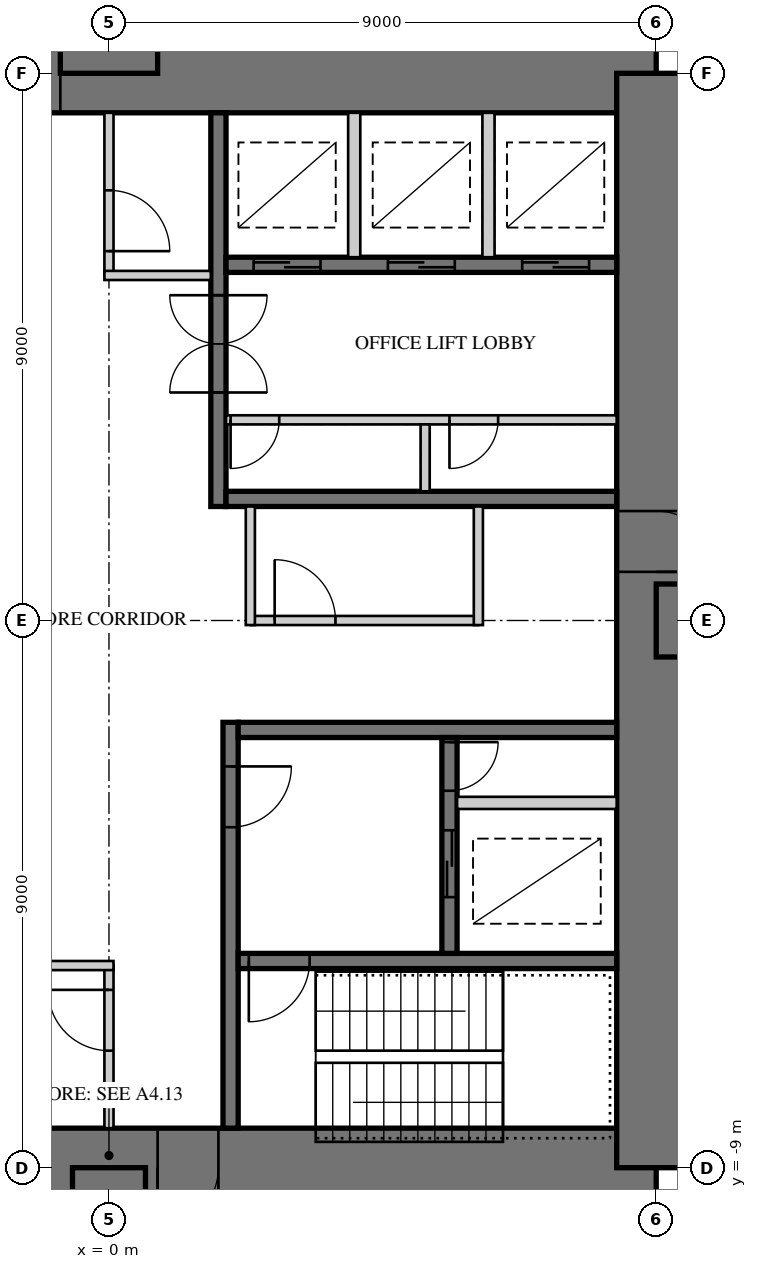
"""IFC4 building model, lengths in metres.
Left out: names, types, materials, properties, quantities, classifications, styles, units other than length and angle.
Written with IfcOpenShell. Run it as: python <this file> out.ifc"""

import sys

from ifc_helpers import new_model, si_unit, direction, frame, frame_2d, origin, place, context, subcontext, project, spatial, rectangle, extrude, element, fill, save


model = new_model("IFC4")
c1 = context("Model", 3, precision=1e-05, world=origin(), true_north=direction((0.0, 1.0)))
c2 = subcontext(c1, "Body", "Model", "MODEL_VIEW")
j1 = project(units=[si_unit("LENGTHUNIT", "METRE"), si_unit("PLANEANGLEUNIT", "RADIAN")], contexts=[c1])
p1 = place(None, origin())
s1 = spatial("IfcSite", under=j1, at=p1, CompositionType="ELEMENT")
p2 = place(p1, origin())
s2 = spatial("IfcBuilding", under=s1, at=p2, CompositionType="ELEMENT")
p3 = place(p2, frame((0.0, 0.0, 59.5)))
s3 = spatial("IfcBuildingStorey", under=s2, at=p3, CompositionType="ELEMENT", Elevation=59.5)
p4 = place(p3, frame((9.0, 9.0, 0.0), z_axis=(0.0, 0.0, 1.0), x_axis=(-1.0, 0.0, 0.0)))
e1 = element("IfcWall", 1, at=p4, inside=s3, PredefinedType="SHEAR", context=c2, shape_type="SweptSolid", body=[
    extrude(rectangle(XDim=18.0, YDim=1.3, at=frame_2d((9.0, 0.0))), origin(), (0.0, 0.0, 1.0), 4.0),
])
p5 = place(p4, frame((9.8, 0.0, 0.0)))
e2 = element("IfcOpeningElement", 2, at=p5, cuts=e1, PredefinedType="OPENING", context=c2, shape_type="SweptSolid", body=[
    extrude(rectangle(XDim=1.0, YDim=2.4, at=frame_2d((0.5, 1.2))), frame((0.0, 0.66, 0.0), z_axis=(0.0, -1.0, 0.0), x_axis=(1.0, 0.0, 0.0)), (0.0, 0.0, 1.0), 1.32),
])
p6 = place(p3, frame((-9.0, -9.0, 0.0), z_axis=(0.0, 0.0, 1.0), x_axis=(1.0, 0.0, 0.0)))
e3 = element("IfcWall", 3, at=p6, inside=s3, PredefinedType="SHEAR", context=c2, shape_type="SweptSolid", body=[
    extrude(rectangle(XDim=18.0, YDim=1.3, at=frame_2d((9.0, 0.0))), origin(), (0.0, 0.0, 1.0), 4.0),
])
p7 = place(p6, frame((9.8, 0.0, 0.0)))
e4 = element("IfcOpeningElement", 4, at=p7, cuts=e3, PredefinedType="OPENING", context=c2, shape_type="SweptSolid", body=[
    extrude(rectangle(XDim=1.0, YDim=2.4, at=frame_2d((0.5, 1.2))), frame((0.0, 0.66, 0.0), z_axis=(0.0, -1.0, 0.0), x_axis=(1.0, 0.0, 0.0)), (0.0, 0.0, 1.0), 1.32),
])
p8 = place(p3, frame((9.0, -9.0, 0.0), z_axis=(0.0, 0.0, 1.0), x_axis=(0.0, 1.0, 0.0)))
e5 = element("IfcWall", 5, at=p8, inside=s3, PredefinedType="SHEAR", context=c2, shape_type="SweptSolid", body=[
    extrude(rectangle(XDim=18.0, YDim=1.3, at=frame_2d((9.0, 0.0))), origin(), (0.0, 0.0, 1.0), 4.0),
])
p9 = place(p8, frame((9.8, 0.0, 0.0)))
e6 = element("IfcOpeningElement", 6, at=p9, cuts=e5, PredefinedType="OPENING", context=c2, shape_type="SweptSolid", body=[
    extrude(rectangle(XDim=1.0, YDim=2.4, at=frame_2d((0.5, 1.2))), frame((0.0, 0.66, 0.0), z_axis=(0.0, -1.0, 0.0), x_axis=(1.0, 0.0, 0.0)), (0.0, 0.0, 1.0), 1.32),
])
p10 = place(p3, frame((1.8, 1.875, 0.0), z_axis=(0.0, 0.0, 1.0), x_axis=(0.0, 1.0, 0.0)))
e7 = element("IfcWall", 7, at=p10, inside=s3, PredefinedType="SHEAR", context=c2, shape_type="SweptSolid", body=[
    extrude(rectangle(XDim=6.475, YDim=0.25, at=frame_2d((3.238, 0.0))), origin(), (0.0, 0.0, 1.0), 4.0),
])
p11 = place(p10, frame((1.875, 0.0, 0.0)))
e8 = element("IfcOpeningElement", 8, at=p11, cuts=e7, PredefinedType="OPENING", context=c2, shape_type="SweptSolid", body=[
    extrude(rectangle(XDim=1.6, YDim=2.4, at=frame_2d((0.8, 1.2))), frame((0.0, 0.135, 0.0), z_axis=(0.0, -1.0, 0.0), x_axis=(1.0, 0.0, 0.0)), (0.0, 0.0, 1.0), 0.27),
])
p12 = place(p3, frame((1.925, 2.0, 0.0), z_axis=(0.0, 0.0, 1.0), x_axis=(1.0, 0.0, 0.0)))
e9 = element("IfcWall", 9, at=p12, inside=s3, PredefinedType="SHEAR", context=c2, shape_type="SweptSolid", body=[
    extrude(rectangle(XDim=6.425, YDim=0.25, at=frame_2d((3.212, 0.0))), origin(), (0.0, 0.0, 1.0), 4.0),
])
p13 = place(p3, frame((1.925, 5.85, 0.0), z_axis=(0.0, 0.0, 1.0), x_axis=(1.0, 0.0, 0.0)))
e10 = element("IfcWall", 10, at=p13, inside=s3, PredefinedType="SHEAR", context=c2, shape_type="SweptSolid", body=[
    extrude(rectangle(XDim=6.425, YDim=0.25, at=frame_2d((3.212, 0.0))), origin(), (0.0, 0.0, 1.0), 4.0),
])
p14 = place(p13, frame((0.454, 0.0, 0.0)))
e11 = element("IfcOpeningElement", 11, at=p14, cuts=e10, PredefinedType="OPENING", context=c2, shape_type="SweptSolid", body=[
    extrude(rectangle(XDim=1.1, YDim=2.2, at=frame_2d((0.55, 1.1))), frame((0.0, 0.135, 0.0), z_axis=(0.0, -1.0, 0.0), x_axis=(1.0, 0.0, 0.0)), (0.0, 0.0, 1.0), 0.27),
])
p15 = place(p13, frame((2.663, 0.0, 0.0)))
e12 = element("IfcOpeningElement", 12, at=p15, cuts=e10, PredefinedType="OPENING", context=c2, shape_type="SweptSolid", body=[
    extrude(rectangle(XDim=1.1, YDim=2.2, at=frame_2d((0.55, 1.1))), frame((0.0, 0.135, 0.0), z_axis=(0.0, -1.0, 0.0), x_axis=(1.0, 0.0, 0.0)), (0.0, 0.0, 1.0), 0.27),
])
p16 = place(p13, frame((4.871, 0.0, 0.0)))
e13 = element("IfcOpeningElement", 13, at=p16, cuts=e10, PredefinedType="OPENING", context=c2, shape_type="SweptSolid", body=[
    extrude(rectangle(XDim=1.1, YDim=2.2, at=frame_2d((0.55, 1.1))), frame((0.0, 0.135, 0.0), z_axis=(0.0, -1.0, 0.0), x_axis=(1.0, 0.0, 0.0)), (0.0, 0.0, 1.0), 0.27),
])
p17 = place(p3, frame((1.925, 3.3, 0.0), z_axis=(0.0, 0.0, 1.0), x_axis=(1.0, 0.0, 0.0)))
e14 = element("IfcWall", 14, at=p17, inside=s3, PredefinedType="PARTITIONING", context=c2, shape_type="SweptSolid", body=[
    extrude(rectangle(XDim=6.425, YDim=0.15, at=frame_2d((3.212, 0.0))), origin(), (0.0, 0.0, 1.0), 4.0),
])
p18 = place(p17, frame((0.075, 0.0, 0.0)))
e15 = element("IfcOpeningElement", 15, at=p18, cuts=e14, PredefinedType="OPENING", context=c2, shape_type="SweptSolid", body=[
    extrude(rectangle(XDim=0.8, YDim=2.1, at=frame_2d((0.4, 1.05))), frame((0.0, 0.085, 0.0), z_axis=(0.0, -1.0, 0.0), x_axis=(1.0, 0.0, 0.0)), (0.0, 0.0, 1.0), 0.17),
])
p19 = place(p17, frame((3.675, 0.0, 0.0)))
e16 = element("IfcOpeningElement", 16, at=p19, cuts=e14, PredefinedType="OPENING", context=c2, shape_type="SweptSolid", body=[
    extrude(rectangle(XDim=0.8, YDim=2.1, at=frame_2d((0.4, 1.05))), frame((0.0, 0.085, 0.0), z_axis=(0.0, -1.0, 0.0), x_axis=(1.0, 0.0, 0.0)), (0.0, 0.0, 1.0), 0.17),
])
p20 = place(p3, frame((5.2, 2.125, 0.0), z_axis=(0.0, 0.0, 1.0), x_axis=(0.0, 1.0, 0.0)))
e17 = element("IfcWall", 17, at=p20, inside=s3, PredefinedType="PARTITIONING", context=c2, shape_type="SweptSolid", body=[
    extrude(rectangle(XDim=1.1, YDim=0.15, at=frame_2d((0.55, 0.0))), origin(), (0.0, 0.0, 1.0), 4.0),
])
for number, where, z_axis, x_axis in (
    (18, (4.033, 5.975, 0.0), (0.0, 0.0, 1.0), (0.0, 1.0, 0.0)),
    (19, (6.242, 5.975, 0.0), (0.0, 0.0, 1.0), (0.0, 1.0, 0.0)),
):
    element("IfcWall", number, at=place(p3, frame(where, z_axis=z_axis, x_axis=x_axis)), inside=s3, PredefinedType="PARTITIONING", context=c2, shape_type="SweptSolid", body=[
        extrude(rectangle(XDim=2.375, YDim=0.2, at=frame_2d((1.188, 0.0))), origin(), (0.0, 0.0, 1.0), 4.0),
    ])
p21 = place(p3, frame((2.0, -1.675, 0.0), z_axis=(0.0, 0.0, 1.0), x_axis=(0.0, -1.0, 0.0)))
e20 = element("IfcWall", 20, at=p21, inside=s3, PredefinedType="SHEAR", context=c2, shape_type="SweptSolid", body=[
    extrude(rectangle(XDim=6.675, YDim=0.25, at=frame_2d((3.337, 0.0))), origin(), (0.0, 0.0, 1.0), 4.0),
])
p22 = place(p21, frame((0.725, 0.0, 0.0)))
e21 = element("IfcOpeningElement", 21, at=p22, cuts=e20, PredefinedType="OPENING", context=c2, shape_type="SweptSolid", body=[
    extrude(rectangle(XDim=1.0, YDim=2.1, at=frame_2d((0.5, 1.05))), frame((0.0, 0.135, 0.0), z_axis=(0.0, -1.0, 0.0), x_axis=(1.0, 0.0, 0.0)), (0.0, 0.0, 1.0), 0.27),
])
p23 = place(p3, frame((2.125, -1.8, 0.0), z_axis=(0.0, 0.0, 1.0), x_axis=(1.0, 0.0, 0.0)))
e22 = element("IfcWall", 22, at=p23, inside=s3, PredefinedType="SHEAR", context=c2, shape_type="SweptSolid", body=[
    extrude(rectangle(XDim=6.225, YDim=0.25, at=frame_2d((3.113, 0.0))), origin(), (0.0, 0.0, 1.0), 4.0),
])
p24 = place(p3, frame((2.125, -5.6, 0.0), z_axis=(0.0, 0.0, 1.0), x_axis=(1.0, 0.0, 0.0)))
e23 = element("IfcWall", 23, at=p24, inside=s3, PredefinedType="SHEAR", context=c2, shape_type="SweptSolid", body=[
    extrude(rectangle(XDim=6.225, YDim=0.25, at=frame_2d((3.113, 0.0))), origin(), (0.0, 0.0, 1.0), 4.0),
])
p25 = place(p24, frame((0.175, 0.0, 0.0)))
e24 = element("IfcOpeningElement", 24, at=p25, cuts=e23, PredefinedType="OPENING", context=c2, shape_type="SweptSolid", body=[
    extrude(rectangle(XDim=1.0, YDim=2.1, at=frame_2d((0.5, 1.05))), frame((0.0, 0.135, 0.0), z_axis=(0.0, -1.0, 0.0), x_axis=(1.0, 0.0, 0.0)), (0.0, 0.0, 1.0), 0.27),
])
p26 = place(p3, frame((5.6, -1.925, 0.0), z_axis=(0.0, 0.0, 1.0), x_axis=(0.0, -1.0, 0.0)))
e25 = element("IfcWall", 25, at=p26, inside=s3, PredefinedType="SHEAR", context=c2, shape_type="SweptSolid", body=[
    extrude(rectangle(XDim=3.55, YDim=0.25, at=frame_2d((1.775, 0.0))), origin(), (0.0, 0.0, 1.0), 4.0),
])
p27 = place(p26, frame((1.525, 0.0, 0.0)))
e26 = element("IfcOpeningElement", 26, at=p27, cuts=e25, PredefinedType="OPENING", context=c2, shape_type="SweptSolid", body=[
    extrude(rectangle(XDim=1.1, YDim=2.2, at=frame_2d((0.55, 1.1))), frame((0.0, 0.135, 0.0), z_axis=(0.0, -1.0, 0.0), x_axis=(1.0, 0.0, 0.0)), (0.0, 0.0, 1.0), 0.27),
])
p28 = place(p26, frame((0.075, 0.0, 0.0)))
e27 = element("IfcOpeningElement", 27, at=p28, cuts=e25, PredefinedType="OPENING", context=c2, shape_type="SweptSolid", body=[
    extrude(rectangle(XDim=0.8, YDim=2.1, at=frame_2d((0.4, 1.05))), frame((0.0, 0.135, 0.0), z_axis=(0.0, -1.0, 0.0), x_axis=(1.0, 0.0, 0.0)), (0.0, 0.0, 1.0), 0.27),
])
p29 = place(p3, frame((5.725, -3.0, 0.0), z_axis=(0.0, 0.0, 1.0), x_axis=(1.0, 0.0, 0.0)))
e28 = element("IfcWall", 28, at=p29, inside=s3, PredefinedType="PARTITIONING", context=c2, shape_type="SweptSolid", body=[
    extrude(rectangle(XDim=2.625, YDim=0.2, at=frame_2d((1.312, 0.0))), origin(), (0.0, 0.0, 1.0), 4.0),
])
p30 = place(p3, frame((0.0, 9.0, 0.0), z_axis=(0.0, 0.0, 1.0), x_axis=(0.0, 1.0, 0.0)))
e29 = element("IfcWall", 29, at=p30, inside=s3, PredefinedType="SHEAR", context=c2, shape_type="SweptSolid", body=[
    extrude(rectangle(XDim=9.0, YDim=1.6, at=frame_2d((4.5, 0.0))), origin(), (0.0, 0.0, 1.0), 4.0),
])
p31 = place(p3, frame((9.0, 0.0, 0.0), z_axis=(0.0, 0.0, 1.0), x_axis=(1.0, 0.0, 0.0)))
e30 = element("IfcWall", 30, at=p31, inside=s3, PredefinedType="SHEAR", context=c2, shape_type="SweptSolid", body=[
    extrude(rectangle(XDim=18.0, YDim=1.2, at=frame_2d((9.0, 0.0))), origin(), (0.0, 0.0, 1.0), 4.0),
])
p32 = place(p31, frame((9.9, 0.0, 0.0)))
e31 = element("IfcOpeningElement", 31, at=p32, cuts=e30, PredefinedType="OPENING", context=c2, shape_type="SweptSolid", body=[
    extrude(rectangle(XDim=1.0, YDim=2.2, at=frame_2d((0.5, 1.1))), frame((0.0, 0.61, 0.0), z_axis=(0.0, -1.0, 0.0), x_axis=(1.0, 0.0, 0.0)), (0.0, 0.0, 1.0), 1.22),
])
p33 = place(p3, frame((0.0, -9.0, 0.0), z_axis=(0.0, 0.0, 1.0), x_axis=(0.0, -1.0, 0.0)))
e32 = element("IfcWall", 32, at=p33, inside=s3, PredefinedType="SHEAR", context=c2, shape_type="SweptSolid", body=[
    extrude(rectangle(XDim=18.0, YDim=1.2, at=frame_2d((9.0, 0.0))), origin(), (0.0, 0.0, 1.0), 4.0),
])
p34 = place(p33, frame((9.9, 0.0, 0.0)))
e33 = element("IfcOpeningElement", 33, at=p34, cuts=e32, PredefinedType="OPENING", context=c2, shape_type="SweptSolid", body=[
    extrude(rectangle(XDim=1.0, YDim=2.2, at=frame_2d((0.5, 1.1))), frame((0.0, 0.61, 0.0), z_axis=(0.0, -1.0, 0.0), x_axis=(1.0, 0.0, 0.0)), (0.0, 0.0, 1.0), 1.22),
])
p35 = place(p3, frame((2.325, 0.0, 0.0), z_axis=(0.0, 0.0, 1.0), x_axis=(1.0, 0.0, 0.0)))
e34 = element("IfcWall", 34, at=p35, inside=s3, PredefinedType="PARTITIONING", context=c2, shape_type="SweptSolid", body=[
    extrude(rectangle(XDim=3.75, YDim=0.15, at=frame_2d((1.875, 0.0))), origin(), (0.0, 0.0, 1.0), 3.8),
])
p36 = place(p35, frame((0.4, 0.0, 0.0)))
e35 = element("IfcOpeningElement", 35, at=p36, cuts=e34, PredefinedType="OPENING", context=c2, shape_type="SweptSolid", body=[
    extrude(rectangle(XDim=1.0, YDim=2.1, at=frame_2d((0.5, 1.05))), frame((0.0, 0.085, 0.0), z_axis=(0.0, -1.0, 0.0), x_axis=(1.0, 0.0, 0.0)), (0.0, 0.0, 1.0), 0.17),
])
for number, where, z_axis, x_axis in (
    (36, (2.325, 1.875, 0.0), (0.0, 0.0, 1.0), (0.0, -1.0, 0.0)),
    (37, (6.075, -0.075, 0.0), (0.0, 0.0, 1.0), (0.0, 1.0, 0.0)),
):
    element("IfcWall", number, at=place(p3, frame(where, z_axis=z_axis, x_axis=x_axis)), inside=s3, PredefinedType="PARTITIONING", context=c2, shape_type="SweptSolid", body=[
        extrude(rectangle(XDim=1.95, YDim=0.15, at=frame_2d((0.975, 0.0))), origin(), (0.0, 0.0, 1.0), 3.8),
    ])
p37 = place(p3, frame((0.0, 5.675, 0.0), z_axis=(0.0, 0.0, 1.0), x_axis=(0.0, 1.0, 0.0)))
e38 = element("IfcWall", 38, at=p37, inside=s3, PredefinedType="PARTITIONING", context=c2, shape_type="SweptSolid", body=[
    extrude(rectangle(XDim=2.675, YDim=0.15, at=frame_2d((1.337, 0.0))), origin(), (0.0, 0.0, 1.0), 3.8),
])
p38 = place(p37, frame((0.4, 0.0, 0.0)))
e39 = element("IfcOpeningElement", 39, at=p38, cuts=e38, PredefinedType="OPENING", context=c2, shape_type="SweptSolid", body=[
    extrude(rectangle(XDim=1.0, YDim=2.1, at=frame_2d((0.5, 1.05))), frame((0.0, 0.085, 0.0), z_axis=(0.0, -1.0, 0.0), x_axis=(1.0, 0.0, 0.0)), (0.0, 0.0, 1.0), 0.17),
])
p39 = place(p3, frame((1.675, 5.675, 0.0), z_axis=(0.0, 0.0, 1.0), x_axis=(-1.0, 0.0, 0.0)))
e40 = element("IfcWall", 40, at=p39, inside=s3, PredefinedType="PARTITIONING", context=c2, shape_type="SweptSolid", body=[
    extrude(rectangle(XDim=1.75, YDim=0.15, at=frame_2d((0.875, 0.0))), origin(), (0.0, 0.0, 1.0), 3.8),
])
p40 = place(p3, frame((0.0, -5.675, 0.0), z_axis=(0.0, 0.0, 1.0), x_axis=(0.0, -1.0, 0.0)))
e41 = element("IfcWall", 41, at=p40, inside=s3, PredefinedType="PARTITIONING", context=c2, shape_type="SweptSolid", body=[
    extrude(rectangle(XDim=2.675, YDim=0.15, at=frame_2d((1.337, 0.0))), origin(), (0.0, 0.0, 1.0), 3.8),
])
p41 = place(p40, frame((0.4, 0.0, 0.0)))
e42 = element("IfcOpeningElement", 42, at=p41, cuts=e41, PredefinedType="OPENING", context=c2, shape_type="SweptSolid", body=[
    extrude(rectangle(XDim=1.0, YDim=2.1, at=frame_2d((0.5, 1.05))), frame((0.0, 0.085, 0.0), z_axis=(0.0, -1.0, 0.0), x_axis=(1.0, 0.0, 0.0)), (0.0, 0.0, 1.0), 0.17),
])
p42 = place(p3, frame((-1.675, -5.675, 0.0), z_axis=(0.0, 0.0, 1.0), x_axis=(1.0, 0.0, 0.0)))
e43 = element("IfcWall", 43, at=p42, inside=s3, PredefinedType="PARTITIONING", context=c2, shape_type="SweptSolid", body=[
    extrude(rectangle(XDim=1.75, YDim=0.15, at=frame_2d((0.875, 0.0))), origin(), (0.0, 0.0, 1.0), 3.8),
])
p43 = place(p36, origin())
e44 = element("IfcDoor", 44, at=p43, inside=s3, OperationType="SINGLE_SWING_LEFT", PredefinedType="DOOR", context=c2, shape_type="SweptSolid", body=[
    extrude(rectangle(XDim=1.0, YDim=2.1, at=frame_2d((0.5, 1.05))), frame((0.0, 0.025, 0.0), z_axis=(0.0, -1.0, 0.0), x_axis=(1.0, 0.0, 0.0)), (0.0, 0.0, 1.0), 0.05),
])
fill(e35, e44)
p44 = place(p38, frame((1.0, 0.0, 0.0), z_axis=(0.0, 0.0, 1.0), x_axis=(-1.0, 0.0, 0.0)))
e45 = element("IfcDoor", 45, at=p44, inside=s3, OperationType="SINGLE_SWING_RIGHT", PredefinedType="DOOR", context=c2, shape_type="SweptSolid", body=[
    extrude(rectangle(XDim=1.0, YDim=2.1, at=frame_2d((0.5, 1.05))), frame((0.0, 0.025, 0.0), z_axis=(0.0, -1.0, 0.0), x_axis=(1.0, 0.0, 0.0)), (0.0, 0.0, 1.0), 0.05),
])
fill(e39, e45)
p45 = place(p41, frame((1.0, 0.0, 0.0), z_axis=(0.0, 0.0, 1.0), x_axis=(-1.0, 0.0, 0.0)))
e46 = element("IfcDoor", 46, at=p45, inside=s3, OperationType="SINGLE_SWING_RIGHT", PredefinedType="DOOR", context=c2, shape_type="SweptSolid", body=[
    extrude(rectangle(XDim=1.0, YDim=2.1, at=frame_2d((0.5, 1.05))), frame((0.0, 0.025, 0.0), z_axis=(0.0, -1.0, 0.0), x_axis=(1.0, 0.0, 0.0)), (0.0, 0.0, 1.0), 0.05),
])
fill(e42, e46)
p46 = place(p5, frame((1.0, 0.0, 0.0), z_axis=(0.0, 0.0, 1.0), x_axis=(-1.0, 0.0, 0.0)))
e47 = element("IfcDoor", 47, at=p46, inside=s3, OperationType="SINGLE_SWING_RIGHT", PredefinedType="DOOR", context=c2, shape_type="SweptSolid", body=[
    extrude(rectangle(XDim=1.0, YDim=2.4, at=frame_2d((0.5, 1.2))), frame((0.0, -0.005, 0.0), z_axis=(0.0, -1.0, 0.0), x_axis=(1.0, 0.0, 0.0)), (0.0, 0.0, 1.0), 0.05),
])
fill(e2, e47)
p47 = place(p7, frame((1.0, 0.0, 0.0), z_axis=(0.0, 0.0, 1.0), x_axis=(-1.0, 0.0, 0.0)))
e48 = element("IfcDoor", 48, at=p47, inside=s3, OperationType="SINGLE_SWING_RIGHT", PredefinedType="DOOR", context=c2, shape_type="SweptSolid", body=[
    extrude(rectangle(XDim=1.0, YDim=2.4, at=frame_2d((0.5, 1.2))), frame((0.0, -0.005, 0.0), z_axis=(0.0, -1.0, 0.0), x_axis=(1.0, 0.0, 0.0)), (0.0, 0.0, 1.0), 0.05),
])
fill(e4, e48)
p48 = place(p9, frame((1.0, 0.0, 0.0), z_axis=(0.0, 0.0, 1.0), x_axis=(-1.0, 0.0, 0.0)))
e49 = element("IfcDoor", 49, at=p48, inside=s3, OperationType="SINGLE_SWING_RIGHT", PredefinedType="DOOR", context=c2, shape_type="SweptSolid", body=[
    extrude(rectangle(XDim=1.0, YDim=2.4, at=frame_2d((0.5, 1.2))), frame((0.0, -0.005, 0.0), z_axis=(0.0, -1.0, 0.0), x_axis=(1.0, 0.0, 0.0)), (0.0, 0.0, 1.0), 0.05),
])
fill(e6, e49)
p49 = place(p14, origin())
e50 = element("IfcDoor", 50, at=p49, inside=s3, OperationType="DOUBLE_DOOR_SLIDING", PredefinedType="DOOR", context=c2, shape_type="SweptSolid", body=[
    extrude(rectangle(XDim=1.1, YDim=2.2, at=frame_2d((0.55, 1.1))), frame((0.0, 0.025, 0.0), z_axis=(0.0, -1.0, 0.0), x_axis=(1.0, 0.0, 0.0)), (0.0, 0.0, 1.0), 0.05),
])
fill(e11, e50)
p50 = place(p15, origin())
e51 = element("IfcDoor", 51, at=p50, inside=s3, OperationType="DOUBLE_DOOR_SLIDING", PredefinedType="DOOR", context=c2, shape_type="SweptSolid", body=[
    extrude(rectangle(XDim=1.1, YDim=2.2, at=frame_2d((0.55, 1.1))), frame((0.0, 0.025, 0.0), z_axis=(0.0, -1.0, 0.0), x_axis=(1.0, 0.0, 0.0)), (0.0, 0.0, 1.0), 0.05),
])
fill(e12, e51)
p51 = place(p16, origin())
e52 = element("IfcDoor", 52, at=p51, inside=s3, OperationType="DOUBLE_DOOR_SLIDING", PredefinedType="DOOR", context=c2, shape_type="SweptSolid", body=[
    extrude(rectangle(XDim=1.1, YDim=2.2, at=frame_2d((0.55, 1.1))), frame((0.0, 0.025, 0.0), z_axis=(0.0, -1.0, 0.0), x_axis=(1.0, 0.0, 0.0)), (0.0, 0.0, 1.0), 0.05),
])
fill(e13, e52)
p52 = place(p11, origin())
e53 = element("IfcDoor", 53, at=p52, inside=s3, OperationType="DOUBLE_DOOR_DOUBLE_SWING", PredefinedType="DOOR", context=c2, shape_type="SweptSolid", body=[
    extrude(rectangle(XDim=1.6, YDim=2.4, at=frame_2d((0.8, 1.2))), frame((0.0, 0.025, 0.0), z_axis=(0.0, -1.0, 0.0), x_axis=(1.0, 0.0, 0.0)), (0.0, 0.0, 1.0), 0.05),
])
fill(e8, e53)
p53 = place(p18, frame((0.8, 0.0, 0.0), z_axis=(0.0, 0.0, 1.0), x_axis=(-1.0, 0.0, 0.0)))
e54 = element("IfcDoor", 54, at=p53, inside=s3, OperationType="SINGLE_SWING_RIGHT", PredefinedType="DOOR", context=c2, shape_type="SweptSolid", body=[
    extrude(rectangle(XDim=0.8, YDim=2.1, at=frame_2d((0.4, 1.05))), frame((0.0, 0.025, 0.0), z_axis=(0.0, -1.0, 0.0), x_axis=(1.0, 0.0, 0.0)), (0.0, 0.0, 1.0), 0.05),
])
fill(e15, e54)
p54 = place(p19, frame((0.8, 0.0, 0.0), z_axis=(0.0, 0.0, 1.0), x_axis=(-1.0, 0.0, 0.0)))
e55 = element("IfcDoor", 55, at=p54, inside=s3, OperationType="SINGLE_SWING_RIGHT", PredefinedType="DOOR", context=c2, shape_type="SweptSolid", body=[
    extrude(rectangle(XDim=0.8, YDim=2.1, at=frame_2d((0.4, 1.05))), frame((0.0, 0.025, 0.0), z_axis=(0.0, -1.0, 0.0), x_axis=(1.0, 0.0, 0.0)), (0.0, 0.0, 1.0), 0.05),
])
fill(e16, e55)
p55 = place(p22, origin())
e56 = element("IfcDoor", 56, at=p55, inside=s3, OperationType="SINGLE_SWING_LEFT", PredefinedType="DOOR", context=c2, shape_type="SweptSolid", body=[
    extrude(rectangle(XDim=1.0, YDim=2.1, at=frame_2d((0.5, 1.05))), frame((0.0, 0.025, 0.0), z_axis=(0.0, -1.0, 0.0), x_axis=(1.0, 0.0, 0.0)), (0.0, 0.0, 1.0), 0.05),
])
fill(e21, e56)
p56 = place(p25, frame((1.0, 0.0, 0.0), z_axis=(0.0, 0.0, 1.0), x_axis=(-1.0, 0.0, 0.0)))
e57 = element("IfcDoor", 57, at=p56, inside=s3, OperationType="SINGLE_SWING_RIGHT", PredefinedType="DOOR", context=c2, shape_type="SweptSolid", body=[
    extrude(rectangle(XDim=1.0, YDim=2.1, at=frame_2d((0.5, 1.05))), frame((0.0, 0.025, 0.0), z_axis=(0.0, -1.0, 0.0), x_axis=(1.0, 0.0, 0.0)), (0.0, 0.0, 1.0), 0.05),
])
fill(e24, e57)
p57 = place(p27, origin())
e58 = element("IfcDoor", 58, at=p57, inside=s3, OperationType="DOUBLE_DOOR_SLIDING", PredefinedType="DOOR", context=c2, shape_type="SweptSolid", body=[
    extrude(rectangle(XDim=1.1, YDim=2.2, at=frame_2d((0.55, 1.1))), frame((0.0, 0.025, 0.0), z_axis=(0.0, -1.0, 0.0), x_axis=(1.0, 0.0, 0.0)), (0.0, 0.0, 1.0), 0.05),
])
fill(e26, e58)
p58 = place(p28, origin())
e59 = element("IfcDoor", 59, at=p58, inside=s3, OperationType="SINGLE_SWING_LEFT", PredefinedType="DOOR", context=c2, shape_type="SweptSolid", body=[
    extrude(rectangle(XDim=0.8, YDim=2.1, at=frame_2d((0.4, 1.05))), frame((0.0, 0.025, 0.0), z_axis=(0.0, -1.0, 0.0), x_axis=(1.0, 0.0, 0.0)), (0.0, 0.0, 1.0), 0.05),
])
fill(e27, e59)
save(model, sys.argv[1])
